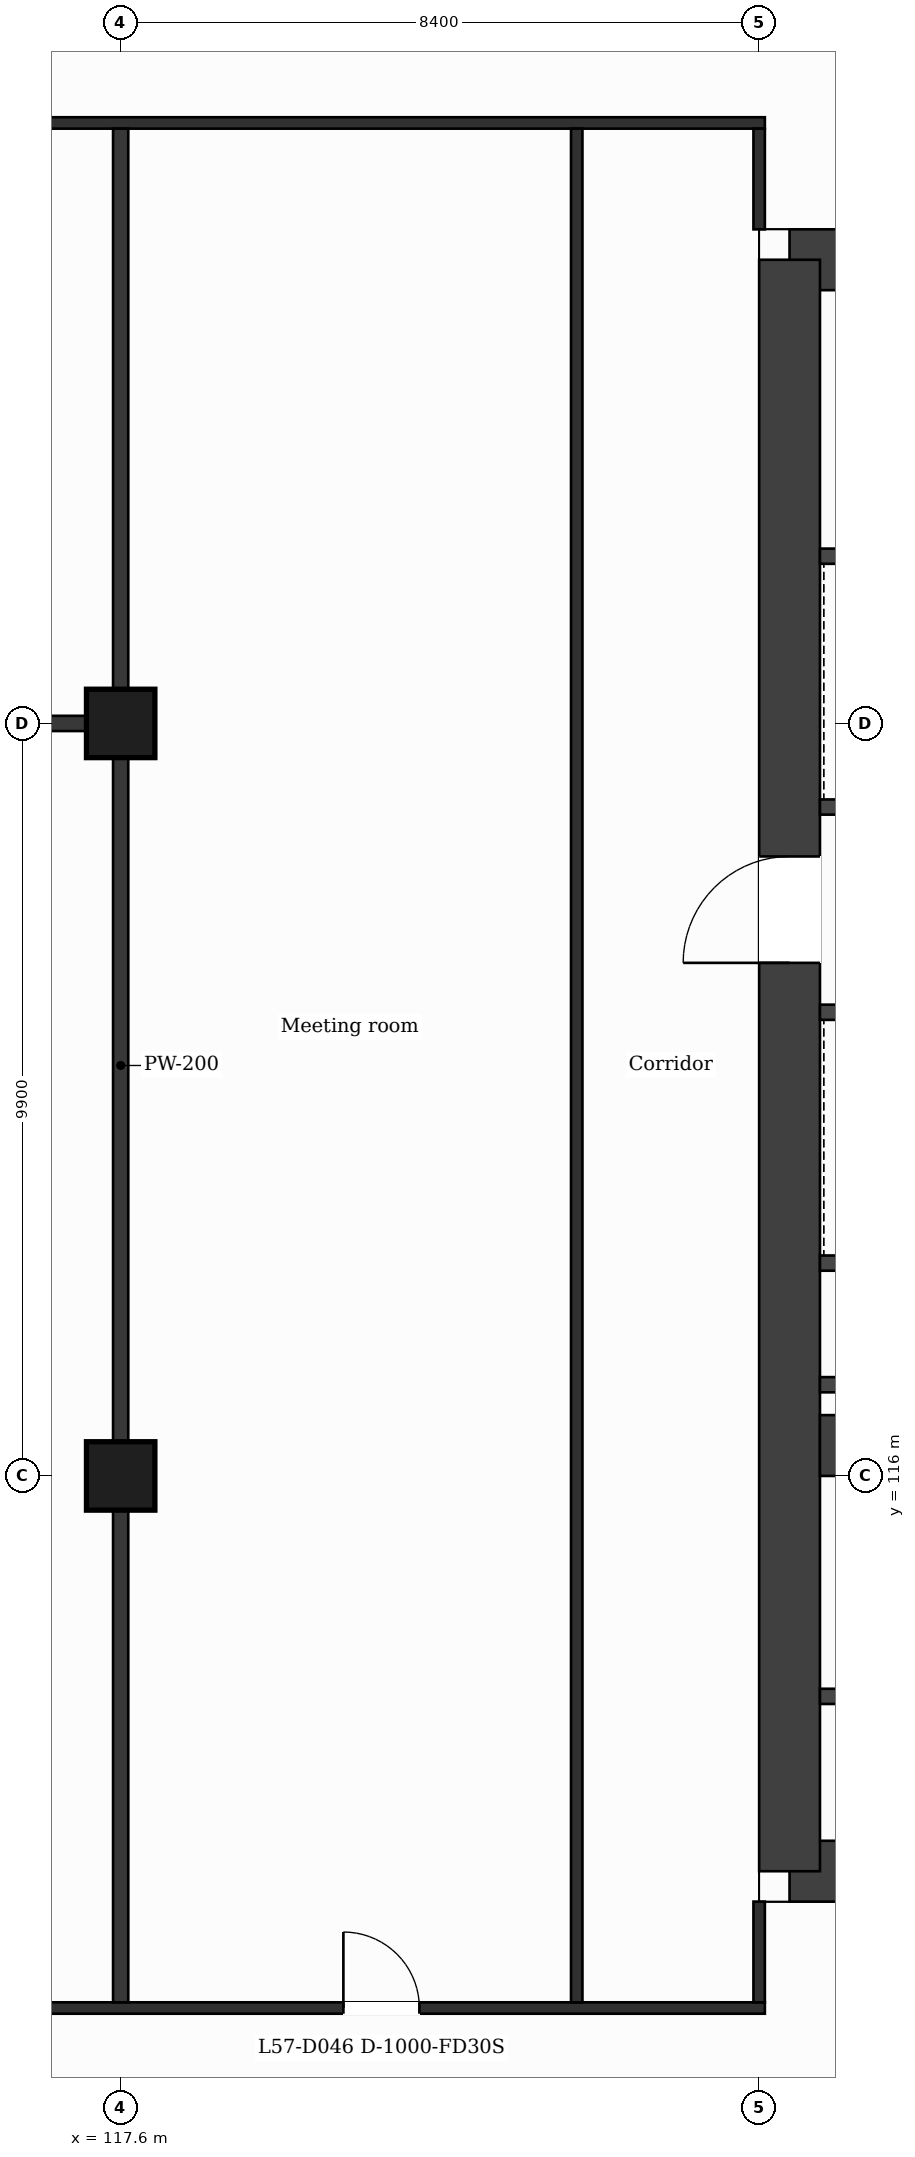
"""IFC4 building model, lengths in metres.
Left out: names, types, materials, properties, quantities, classifications, styles, units other than length and angle.
Written with IfcOpenShell. Run it as: python <this file> out.ifc"""

import sys

from ifc_helpers import new_model, si_unit, direction, frame, frame_2d, origin, origin_2d, place, context, subcontext, project, spatial, rectangle, extrude, element, fill, save


model = new_model("IFC4")
c1 = context("Model", 3, precision=1e-05, world=origin(), true_north=direction((0.0, 1.0)))
c2 = subcontext(c1, "Body", "Model", "MODEL_VIEW")
j1 = project(units=[si_unit("LENGTHUNIT", "METRE"), si_unit("PLANEANGLEUNIT", "RADIAN")], contexts=[c1])
p1 = place(None, origin())
s1 = spatial("IfcSite", under=j1, at=p1, CompositionType="ELEMENT")
p2 = place(p1, origin())
s2 = spatial("IfcBuilding", under=s1, at=p2, CompositionType="ELEMENT")
p3 = place(p2, frame((0.0, 0.0, 235.5)))
s3 = spatial("IfcBuildingStorey", under=s2, at=p3, CompositionType="ELEMENT", Elevation=235.5)
p4 = place(p3, frame((126.4, 132.0, 0.0), z_axis=(0.0, 0.0, 1.0), x_axis=(1.0, 0.0, 0.0)))
e1 = element("IfcWall", 1, at=p4, inside=s3, PredefinedType="SHEAR", context=c2, shape_type="SweptSolid", body=[
    extrude(rectangle(XDim=11.42, YDim=0.8, at=frame_2d((5.71, 0.0))), origin(), (0.0, 0.0, 1.0), 3.7),
])
p5 = place(p4, frame((3.386, 0.0, 0.0)))
e2 = element("IfcOpeningElement", 2, at=p5, cuts=e1, PredefinedType="OPENING", context=c2, shape_type="SweptSolid", body=[
    extrude(rectangle(XDim=1.2, YDim=2.1, at=frame_2d((0.6, 1.05))), frame((0.0, 0.41, 0.0), z_axis=(0.0, -1.0, 0.0), x_axis=(1.0, 0.0, 0.0)), (0.0, 0.0, 1.0), 0.82),
])
p6 = place(p3, frame((140.673, 110.8, 0.0), z_axis=(0.0, 0.0, 1.0), x_axis=(-1.0, 0.0, 0.0)))
e3 = element("IfcWall", 3, at=p6, inside=s3, PredefinedType="SHEAR", context=c2, shape_type="SweptSolid", body=[
    extrude(rectangle(XDim=14.273, YDim=0.8, at=frame_2d((7.137, 0.0))), origin(), (0.0, 0.0, 1.0), 3.7),
])
p7 = place(p6, frame((6.965, 0.0, 0.0)))
e4 = element("IfcOpeningElement", 4, at=p7, cuts=e3, PredefinedType="OPENING", context=c2, shape_type="SweptSolid", body=[
    extrude(rectangle(XDim=1.4, YDim=2.1, at=frame_2d((0.7, 1.05))), frame((0.0, 0.41, 0.0), z_axis=(0.0, -1.0, 0.0), x_axis=(1.0, 0.0, 0.0)), (0.0, 0.0, 1.0), 0.82),
])
p8 = place(p3, frame((126.4, 110.8, 0.0), z_axis=(0.0, 0.0, 1.0), x_axis=(0.0, 1.0, 0.0)))
e5 = element("IfcWall", 5, at=p8, inside=s3, PredefinedType="SHEAR", context=c2, shape_type="SweptSolid", body=[
    extrude(rectangle(XDim=21.2, YDim=0.8, at=frame_2d((10.6, 0.0))), origin(), (0.0, 0.0, 1.0), 3.7),
])
p9 = place(p8, frame((11.95, 0.0, 0.0)))
e6 = element("IfcOpeningElement", 6, at=p9, cuts=e5, PredefinedType="OPENING", context=c2, shape_type="SweptSolid", body=[
    extrude(rectangle(XDim=1.4, YDim=2.1, at=frame_2d((0.7, 1.05))), frame((0.0, 0.41, 0.0), z_axis=(0.0, -1.0, 0.0), x_axis=(1.0, 0.0, 0.0)), (0.0, 0.0, 1.0), 0.82),
])
p10 = place(p3, frame((126.8, 116.4, 0.0), z_axis=(0.0, 0.0, 1.0), x_axis=(1.0, 0.0, 0.0)))
e7 = element("IfcWall", 7, at=p10, inside=s3, PredefinedType="SHEAR", context=c2, shape_type="SweptSolid", body=[
    extrude(rectangle(XDim=5.3, YDim=0.8, at=frame_2d((2.65, 0.0))), origin(), (0.0, 0.0, 1.0), 3.7),
])
for number, where, z_axis, x_axis in (
    (8, (117.6, 116.0, 0.0), (0.0, 0.0, 1.0), (1.0, 0.0, 0.0)),
    (9, (117.6, 125.9, 0.0), (0.0, 0.0, 1.0), (1.0, 0.0, 0.0)),
):
    element("IfcColumn", number, at=place(p3, frame(where, z_axis=z_axis, x_axis=x_axis)), inside=s3, PredefinedType="COLUMN", context=c2, shape_type="SweptSolid", body=[
        extrude(rectangle(XDim=0.9, YDim=0.9, at=origin_2d()), origin(), (0.0, 0.0, 1.0), 3.7),
    ])
p11 = place(p3, frame((100.725, 109.0, 0.0), z_axis=(0.0, 0.0, 1.0), x_axis=(1.0, 0.0, 0.0)))
e10 = element("IfcWall", 10, at=p11, inside=s3, PredefinedType="PARTITIONING", context=c2, shape_type="SweptSolid", body=[
    extrude(rectangle(XDim=25.35, YDim=0.15, at=frame_2d((12.675, 0.0))), origin(), (0.0, 0.0, 1.0), 3.38),
])
p12 = place(p11, frame((5.405, 0.0, 0.0)))
e11 = element("IfcOpeningElement", 11, at=p12, cuts=e10, PredefinedType="OPENING", context=c2, shape_type="SweptSolid", body=[
    extrude(rectangle(XDim=1.0, YDim=2.1, at=frame_2d((0.5, 1.05))), frame((0.0, 0.085, 0.0), z_axis=(0.0, -1.0, 0.0), x_axis=(1.0, 0.0, 0.0)), (0.0, 0.0, 1.0), 0.17),
])
p13 = place(p11, frame((12.845, 0.0, 0.0)))
e12 = element("IfcOpeningElement", 12, at=p13, cuts=e10, PredefinedType="OPENING", context=c2, shape_type="SweptSolid", body=[
    extrude(rectangle(XDim=1.0, YDim=2.1, at=frame_2d((0.5, 1.05))), frame((0.0, 0.085, 0.0), z_axis=(0.0, -1.0, 0.0), x_axis=(1.0, 0.0, 0.0)), (0.0, 0.0, 1.0), 0.17),
])
p14 = place(p11, frame((19.805, 0.0, 0.0)))
e13 = element("IfcOpeningElement", 13, at=p14, cuts=e10, PredefinedType="OPENING", context=c2, shape_type="SweptSolid", body=[
    extrude(rectangle(XDim=1.0, YDim=2.1, at=frame_2d((0.5, 1.05))), frame((0.0, 0.085, 0.0), z_axis=(0.0, -1.0, 0.0), x_axis=(1.0, 0.0, 0.0)), (0.0, 0.0, 1.0), 0.17),
])
p15 = place(p3, frame((126.8, 113.1, 0.0), z_axis=(0.0, 0.0, 1.0), x_axis=(1.0, 0.0, 0.0)))
e14 = element("IfcWall", 14, at=p15, inside=s3, PredefinedType="PARTITIONING", context=c2, shape_type="SweptSolid", body=[
    extrude(rectangle(XDim=4.873, YDim=0.2, at=frame_2d((2.437, 0.0))), origin(), (0.0, 0.0, 1.0), 3.38),
])
p16 = place(p15, frame((2.73, 0.0, 0.0)))
e15 = element("IfcOpeningElement", 15, at=p16, cuts=e14, PredefinedType="OPENING", context=c2, shape_type="SweptSolid", body=[
    extrude(rectangle(XDim=0.9, YDim=2.1, at=frame_2d((0.45, 1.05))), frame((0.0, 0.11, 0.0), z_axis=(0.0, -1.0, 0.0), x_axis=(1.0, 0.0, 0.0)), (0.0, 0.0, 1.0), 0.22),
])
for number, where, z_axis, x_axis in (
    (16, (126.8, 117.2, 0.0), (0.0, 0.0, 1.0), (1.0, 0.0, 0.0)),
    (17, (126.8, 118.8, 0.0), (0.0, 0.0, 1.0), (1.0, 0.0, 0.0)),
):
    element("IfcWall", number, at=place(p3, frame(where, z_axis=z_axis, x_axis=x_axis)), inside=s3, PredefinedType="PARTITIONING", context=c2, shape_type="SweptSolid", body=[
        extrude(rectangle(XDim=4.773, YDim=0.2, at=frame_2d((2.386, 0.0))), origin(), (0.0, 0.0, 1.0), 3.38),
    ])
p17 = place(p3, frame((126.8, 122.1, 0.0), z_axis=(0.0, 0.0, 1.0), x_axis=(1.0, 0.0, 0.0)))
e18 = element("IfcWall", 18, at=p17, inside=s3, PredefinedType="PARTITIONING", context=c2, shape_type="SweptSolid", body=[
    extrude(rectangle(XDim=4.773, YDim=0.2, at=frame_2d((2.386, 0.0))), origin(), (0.0, 0.0, 1.0), 3.38),
])
p18 = place(p17, frame((2.971, 0.0, 0.0)))
e19 = element("IfcOpeningElement", 19, at=p18, cuts=e18, PredefinedType="OPENING", context=c2, shape_type="SweptSolid", body=[
    extrude(rectangle(XDim=1.1, YDim=2.1, at=frame_2d((0.55, 1.05))), frame((0.0, 0.11, 0.0), z_axis=(0.0, -1.0, 0.0), x_axis=(1.0, 0.0, 0.0)), (0.0, 0.0, 1.0), 0.22),
])
p19 = place(p17, frame((0.497, 0.0, 0.0)))
e20 = element("IfcOpeningElement", 20, at=p19, cuts=e18, PredefinedType="OPENING", context=c2, shape_type="SweptSolid", body=[
    extrude(rectangle(XDim=1.1, YDim=2.1, at=frame_2d((0.55, 1.05))), frame((0.0, 0.11, 0.0), z_axis=(0.0, -1.0, 0.0), x_axis=(1.0, 0.0, 0.0)), (0.0, 0.0, 1.0), 0.22),
])
p20 = place(p3, frame((126.8, 124.8, 0.0), z_axis=(0.0, 0.0, 1.0), x_axis=(1.0, 0.0, 0.0)))
e21 = element("IfcWall", 21, at=p20, inside=s3, PredefinedType="PARTITIONING", context=c2, shape_type="SweptSolid", body=[
    extrude(rectangle(XDim=4.782, YDim=0.2, at=frame_2d((2.391, 0.0))), origin(), (0.0, 0.0, 1.0), 3.38),
])
p21 = place(p20, frame((0.793, 0.0, 0.0)))
e22 = element("IfcOpeningElement", 22, at=p21, cuts=e21, PredefinedType="OPENING", context=c2, shape_type="SweptSolid", body=[
    extrude(rectangle(XDim=1.1, YDim=2.1, at=frame_2d((0.55, 1.05))), frame((0.0, 0.11, 0.0), z_axis=(0.0, -1.0, 0.0), x_axis=(1.0, 0.0, 0.0)), (0.0, 0.0, 1.0), 0.22),
])
p22 = place(p3, frame((109.2, 125.9, 0.0), z_axis=(0.0, 0.0, 1.0), x_axis=(1.0, 0.0, 0.0)))
e23 = element("IfcWall", 23, at=p22, inside=s3, PredefinedType="PARTITIONING", context=c2, shape_type="SweptSolid", body=[
    extrude(rectangle(XDim=8.4, YDim=0.2, at=frame_2d((4.2, 0.0))), origin(), (0.0, 0.0, 1.0), 3.38),
])
p23 = place(p3, frame((126.8, 128.1, 0.0), z_axis=(0.0, 0.0, 1.0), x_axis=(1.0, 0.0, 0.0)))
e24 = element("IfcWall", 24, at=p23, inside=s3, PredefinedType="PARTITIONING", context=c2, shape_type="SweptSolid", body=[
    extrude(rectangle(XDim=4.782, YDim=0.2, at=frame_2d((2.391, 0.0))), origin(), (0.0, 0.0, 1.0), 3.38),
])
p24 = place(p23, frame((3.184, 0.0, 0.0)))
e25 = element("IfcOpeningElement", 25, at=p24, cuts=e24, PredefinedType="OPENING", context=c2, shape_type="SweptSolid", body=[
    extrude(rectangle(XDim=1.1, YDim=2.1, at=frame_2d((0.55, 1.05))), frame((0.0, 0.11, 0.0), z_axis=(0.0, -1.0, 0.0), x_axis=(1.0, 0.0, 0.0)), (0.0, 0.0, 1.0), 0.22),
])
p25 = place(p3, frame((100.725, 133.8, 0.0), z_axis=(0.0, 0.0, 1.0), x_axis=(1.0, 0.0, 0.0)))
e26 = element("IfcWall", 26, at=p25, inside=s3, PredefinedType="PARTITIONING", context=c2, shape_type="SweptSolid", body=[
    extrude(rectangle(XDim=25.35, YDim=0.15, at=frame_2d((12.675, 0.0))), origin(), (0.0, 0.0, 1.0), 3.38),
])
p26 = place(p25, frame((12.845, 0.0, 0.0)))
e27 = element("IfcOpeningElement", 27, at=p26, cuts=e26, PredefinedType="OPENING", context=c2, shape_type="SweptSolid", body=[
    extrude(rectangle(XDim=1.0, YDim=2.1, at=frame_2d((0.5, 1.05))), frame((0.0, 0.085, 0.0), z_axis=(0.0, -1.0, 0.0), x_axis=(1.0, 0.0, 0.0)), (0.0, 0.0, 1.0), 0.17),
])
p27 = place(p3, frame((117.6, 109.075, 0.0), z_axis=(0.0, 0.0, 1.0), x_axis=(0.0, 1.0, 0.0)))
e28 = element("IfcWall", 28, at=p27, inside=s3, PredefinedType="PARTITIONING", context=c2, shape_type="SweptSolid", body=[
    extrude(rectangle(XDim=24.65, YDim=0.2, at=frame_2d((12.325, 0.0))), origin(), (0.0, 0.0, 1.0), 3.38),
])
p28 = place(p3, frame((123.6, 109.075, 0.0), z_axis=(0.0, 0.0, 1.0), x_axis=(0.0, 1.0, 0.0)))
e29 = element("IfcWall", 29, at=p28, inside=s3, PredefinedType="PARTITIONING", context=c2, shape_type="SweptSolid", body=[
    extrude(rectangle(XDim=24.65, YDim=0.15, at=frame_2d((12.325, 0.0))), origin(), (0.0, 0.0, 1.0), 3.38),
])
p29 = place(p3, frame((126.0, 109.075, 0.0), z_axis=(0.0, 0.0, 1.0), x_axis=(0.0, 1.0, 0.0)))
e30 = element("IfcWall", 30, at=p29, inside=s3, PredefinedType="PARTITIONING", context=c2, shape_type="SweptSolid", body=[
    extrude(rectangle(XDim=1.325, YDim=0.15, at=frame_2d((0.663, 0.0))), origin(), (0.0, 0.0, 1.0), 3.38),
])
p30 = place(p3, frame((126.0, 132.4, 0.0), z_axis=(0.0, 0.0, 1.0), x_axis=(0.0, 1.0, 0.0)))
e31 = element("IfcWall", 31, at=p30, inside=s3, PredefinedType="PARTITIONING", context=c2, shape_type="SweptSolid", body=[
    extrude(rectangle(XDim=1.325, YDim=0.15, at=frame_2d((0.663, 0.0))), origin(), (0.0, 0.0, 1.0), 3.38),
])
p31 = place(p14, origin())
e32 = element("IfcDoor", 32, at=p31, inside=s3, OperationType="SINGLE_SWING_LEFT", PredefinedType="DOOR", context=c2, shape_type="SweptSolid", body=[
    extrude(rectangle(XDim=1.0, YDim=2.1, at=frame_2d((0.5, 1.05))), frame((0.0, 0.025, 0.0), z_axis=(0.0, -1.0, 0.0), x_axis=(1.0, 0.0, 0.0)), (0.0, 0.0, 1.0), 0.05),
])
fill(e13, e32)
p32 = place(p9, origin())
e33 = element("IfcDoor", 33, at=p32, inside=s3, OperationType="SINGLE_SWING_LEFT", PredefinedType="DOOR", context=c2, shape_type="SweptSolid", body=[
    extrude(rectangle(XDim=1.4, YDim=2.1, at=frame_2d((0.7, 1.05))), frame((0.0, 0.025, 0.0), z_axis=(0.0, -1.0, 0.0), x_axis=(1.0, 0.0, 0.0)), (0.0, 0.0, 1.0), 0.05),
])
fill(e6, e33)
save(model, sys.argv[1])
